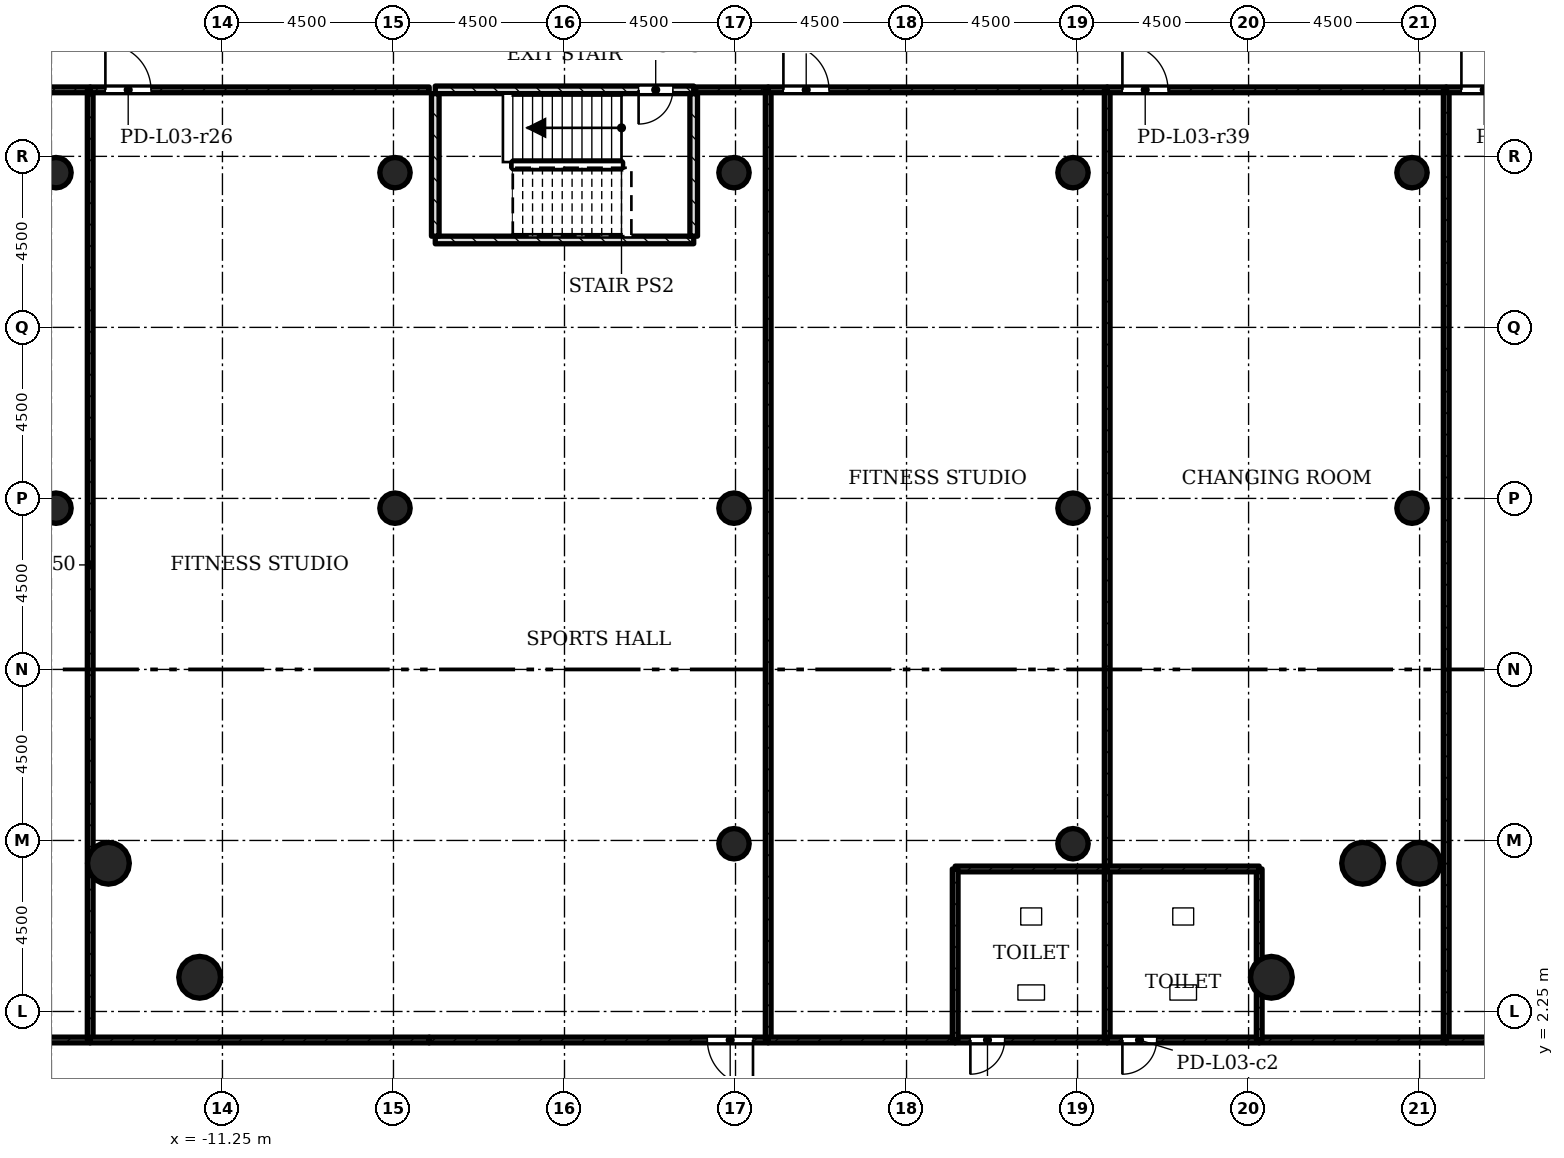
"""IFC4 building model, lengths in metres.
Left out: names, types, materials, properties, quantities, classifications, styles, units other than length and angle.
Written with IfcOpenShell. Run it as: python <this file> out.ifc"""

import sys

from ifc_helpers import new_model, si_unit, direction, frame, frame_2d, origin, origin_2d, place, context, subcontext, project, spatial, rectangle, hollow_circle, extrude, element, fill, save


model = new_model("IFC4")
c1 = context("Model", 3, precision=1e-05, world=origin(), true_north=direction((0.0, 1.0)))
c2 = subcontext(c1, "Body", "Model", "MODEL_VIEW")
j1 = project(units=[si_unit("LENGTHUNIT", "METRE"), si_unit("PLANEANGLEUNIT", "RADIAN")], contexts=[c1])
p1 = place(None, origin())
s1 = spatial("IfcSite", under=j1, at=p1, CompositionType="ELEMENT")
p2 = place(p1, origin())
s2 = spatial("IfcBuilding", under=s1, at=p2, CompositionType="ELEMENT")
p3 = place(p2, frame((0.0, 0.0, 15.5)))
s3 = spatial("IfcBuildingStorey", under=s2, at=p3, CompositionType="ELEMENT", Elevation=15.5)
for number, where, z_axis, x_axis in (
    (1, (-14.25, 6.15, 0.0), (0.0, 0.0, 1.0), (1.0, 0.0, 0.0)),
    (2, (-11.85, 3.15, 0.0), (0.0, 0.0, 1.0), (1.0, 0.0, 0.0)),
    (3, (20.25, 6.15, 0.0), (0.0, 0.0, 1.0), (1.0, 0.0, 0.0)),
    (4, (18.75, 6.15, 0.0), (0.0, 0.0, 1.0), (1.0, 0.0, 0.0)),
    (5, (16.35, 3.15, 0.0), (0.0, 0.0, 1.0), (1.0, 0.0, 0.0)),
):
    element("IfcColumn", number, at=place(p3, frame(where, z_axis=z_axis, x_axis=x_axis)), inside=s3, PredefinedType="COLUMN", context=c2, shape_type="SweptSolid", body=[
        extrude(hollow_circle(Radius=0.55, WallThickness=0.04, at=origin_2d()), origin(), (0.0, 0.0, 1.0), 4.5),
    ])
for number, where, z_axis, x_axis in (
    (6, (2.21, 6.664, 0.0), (0.0, 0.0, 1.0), (1.0, 0.0, 0.0)),
    (7, (11.13, 6.664, 0.0), (0.0, 0.0, 1.0), (1.0, 0.0, 0.0)),
    (8, (-15.63, 15.493, 0.0), (0.0, 0.0, 1.0), (1.0, 0.0, 0.0)),
    (9, (-6.71, 15.493, 0.0), (0.0, 0.0, 1.0), (1.0, 0.0, 0.0)),
    (10, (2.21, 15.493, 0.0), (0.0, 0.0, 1.0), (1.0, 0.0, 0.0)),
    (11, (11.13, 15.493, 0.0), (0.0, 0.0, 1.0), (1.0, 0.0, 0.0)),
    (12, (20.05, 15.493, 0.0), (0.0, 0.0, 1.0), (1.0, 0.0, 0.0)),
    (13, (-15.63, 24.321, 0.0), (0.0, 0.0, 1.0), (1.0, 0.0, 0.0)),
    (14, (-6.71, 24.321, 0.0), (0.0, 0.0, 1.0), (1.0, 0.0, 0.0)),
    (15, (2.21, 24.321, 0.0), (0.0, 0.0, 1.0), (1.0, 0.0, 0.0)),
    (16, (11.13, 24.321, 0.0), (0.0, 0.0, 1.0), (1.0, 0.0, 0.0)),
    (17, (20.05, 24.321, 0.0), (0.0, 0.0, 1.0), (1.0, 0.0, 0.0)),
):
    element("IfcColumn", number, at=place(p3, frame(where, z_axis=z_axis, x_axis=x_axis)), inside=s3, PredefinedType="COLUMN", context=c2, shape_type="SweptSolid", body=[
        extrude(hollow_circle(Radius=0.4, WallThickness=0.028, at=origin_2d()), origin(), (0.0, 0.0, 1.0), 4.5),
    ])
p4 = place(p3, frame((-23.65, 26.5, 0.0), z_axis=(0.0, 0.0, 1.0), x_axis=(1.0, 0.0, 0.0)))
e18 = element("IfcWall", 18, at=p4, inside=s3, PredefinedType="PARTITIONING", context=c2, shape_type="SweptSolid", body=[
    extrude(rectangle(XDim=8.92, YDim=0.15, at=frame_2d((4.46, 0.0))), origin(), (0.0, 0.0, 1.0), 4.08),
])
p5 = place(p4, frame((0.4, 0.0, 0.0)))
e19 = element("IfcOpeningElement", 19, at=p5, cuts=e18, PredefinedType="OPENING", context=c2, shape_type="SweptSolid", body=[
    extrude(rectangle(XDim=1.2, YDim=2.1, at=frame_2d((0.6, 1.05))), frame((0.0, 0.085, 0.0), z_axis=(0.0, -1.0, 0.0), x_axis=(1.0, 0.0, 0.0)), (0.0, 0.0, 1.0), 0.17),
])
p6 = place(p3, frame((-14.73, 1.5, 0.0), z_axis=(0.0, 0.0, 1.0), x_axis=(-1.0, 0.0, 0.0)))
e20 = element("IfcWall", 20, at=p6, inside=s3, PredefinedType="PARTITIONING", context=c2, shape_type="SweptSolid", body=[
    extrude(rectangle(XDim=5.52, YDim=0.15, at=frame_2d((2.76, 0.0))), origin(), (0.0, 0.0, 1.0), 4.08),
])
p7 = place(p3, frame((-14.73, 26.5, 0.0), z_axis=(0.0, 0.0, 1.0), x_axis=(0.0, -1.0, 0.0)))
e21 = element("IfcWall", 21, at=p7, inside=s3, PredefinedType="PARTITIONING", context=c2, shape_type="SweptSolid", body=[
    extrude(rectangle(XDim=25.0, YDim=0.15, at=frame_2d((12.5, 0.0))), origin(), (0.0, 0.0, 1.0), 4.08),
])
p8 = place(p3, frame((-14.73, 26.5, 0.0), z_axis=(0.0, 0.0, 1.0), x_axis=(1.0, 0.0, 0.0)))
e22 = element("IfcWall", 22, at=p8, inside=s3, PredefinedType="PARTITIONING", context=c2, shape_type="SweptSolid", body=[
    extrude(rectangle(XDim=8.92, YDim=0.15, at=frame_2d((4.46, 0.0))), origin(), (0.0, 0.0, 1.0), 4.08),
])
p9 = place(p8, frame((0.4, 0.0, 0.0)))
e23 = element("IfcOpeningElement", 23, at=p9, cuts=e22, PredefinedType="OPENING", context=c2, shape_type="SweptSolid", body=[
    extrude(rectangle(XDim=1.2, YDim=2.1, at=frame_2d((0.6, 1.05))), frame((0.0, 0.085, 0.0), z_axis=(0.0, -1.0, 0.0), x_axis=(1.0, 0.0, 0.0)), (0.0, 0.0, 1.0), 0.17),
])
p10 = place(p3, frame((-5.81, 1.5, 0.0), z_axis=(0.0, 0.0, 1.0), x_axis=(-1.0, 0.0, 0.0)))
e24 = element("IfcWall", 24, at=p10, inside=s3, PredefinedType="PARTITIONING", context=c2, shape_type="SweptSolid", body=[
    extrude(rectangle(XDim=8.92, YDim=0.15, at=frame_2d((4.46, 0.0))), origin(), (0.0, 0.0, 1.0), 4.08),
])
p11 = place(p3, frame((-5.65, 26.5, 0.0), z_axis=(0.0, 0.0, 1.0), x_axis=(1.0, 0.0, 0.0)))
e25 = element("IfcWall", 25, at=p11, inside=s3, PredefinedType="SHEAR", context=c2, shape_type="SweptSolid", body=[
    extrude(rectangle(XDim=6.8, YDim=0.2, at=frame_2d((3.4, 0.0))), origin(), (0.0, 0.0, 1.0), 4.08),
])
p12 = place(p11, frame((5.35, 0.0, 0.0)))
e26 = element("IfcOpeningElement", 26, at=p12, cuts=e25, PredefinedType="OPENING", context=c2, shape_type="SweptSolid", body=[
    extrude(rectangle(XDim=0.9, YDim=2.1, at=frame_2d((0.45, 1.05))), frame((0.0, 0.11, 0.0), z_axis=(0.0, -1.0, 0.0), x_axis=(1.0, 0.0, 0.0)), (0.0, 0.0, 1.0), 0.22),
])
p13 = place(p3, frame((-5.65, 22.55, 0.0), z_axis=(0.0, 0.0, 1.0), x_axis=(1.0, 0.0, 0.0)))
e27 = element("IfcWall", 27, at=p13, inside=s3, PredefinedType="SHEAR", context=c2, shape_type="SweptSolid", body=[
    extrude(rectangle(XDim=6.8, YDim=0.2, at=frame_2d((3.4, 0.0))), origin(), (0.0, 0.0, 1.0), 4.08),
])
for number, where, z_axis, x_axis in (
    (28, (-5.65, 22.65, 0.0), (0.0, 0.0, 1.0), (0.0, 1.0, 0.0)),
    (29, (1.15, 22.65, 0.0), (0.0, 0.0, 1.0), (0.0, 1.0, 0.0)),
):
    element("IfcWall", number, at=place(p3, frame(where, z_axis=z_axis, x_axis=x_axis)), inside=s3, PredefinedType="SHEAR", context=c2, shape_type="SweptSolid", body=[
        extrude(rectangle(XDim=3.75, YDim=0.2, at=frame_2d((1.875, 0.0))), origin(), (0.0, 0.0, 1.0), 4.08),
    ])
p14 = place(p3, frame((1.15, 26.5, 0.0), z_axis=(0.0, 0.0, 1.0), x_axis=(1.0, 0.0, 0.0)))
e30 = element("IfcWall", 30, at=p14, inside=s3, PredefinedType="PARTITIONING", context=c2, shape_type="SweptSolid", body=[
    extrude(rectangle(XDim=1.96, YDim=0.15, at=frame_2d((0.98, 0.0))), origin(), (0.0, 0.0, 1.0), 4.08),
])
p15 = place(p3, frame((3.11, 1.5, 0.0), z_axis=(0.0, 0.0, 1.0), x_axis=(-1.0, 0.0, 0.0)))
e31 = element("IfcWall", 31, at=p15, inside=s3, PredefinedType="PARTITIONING", context=c2, shape_type="SweptSolid", body=[
    extrude(rectangle(XDim=8.92, YDim=0.15, at=frame_2d((4.46, 0.0))), origin(), (0.0, 0.0, 1.0), 4.08),
])
p16 = place(p15, frame((0.4, 0.0, 0.0)))
e32 = element("IfcOpeningElement", 32, at=p16, cuts=e31, PredefinedType="OPENING", context=c2, shape_type="SweptSolid", body=[
    extrude(rectangle(XDim=1.2, YDim=2.1, at=frame_2d((0.6, 1.05))), frame((0.0, 0.085, 0.0), z_axis=(0.0, -1.0, 0.0), x_axis=(1.0, 0.0, 0.0)), (0.0, 0.0, 1.0), 0.17),
])
p17 = place(p3, frame((3.11, 26.5, 0.0), z_axis=(0.0, 0.0, 1.0), x_axis=(0.0, -1.0, 0.0)))
e33 = element("IfcWall", 33, at=p17, inside=s3, PredefinedType="PARTITIONING", context=c2, shape_type="SweptSolid", body=[
    extrude(rectangle(XDim=25.0, YDim=0.15, at=frame_2d((12.5, 0.0))), origin(), (0.0, 0.0, 1.0), 4.08),
])
p18 = place(p3, frame((8.03, 1.5, 0.0), z_axis=(0.0, 0.0, 1.0), x_axis=(-1.0, 0.0, 0.0)))
e34 = element("IfcWall", 34, at=p18, inside=s3, PredefinedType="PARTITIONING", context=c2, shape_type="SweptSolid", body=[
    extrude(rectangle(XDim=4.92, YDim=0.15, at=frame_2d((2.46, 0.0))), origin(), (0.0, 0.0, 1.0), 4.08),
])
p19 = place(p3, frame((3.11, 26.5, 0.0), z_axis=(0.0, 0.0, 1.0), x_axis=(1.0, 0.0, 0.0)))
e35 = element("IfcWall", 35, at=p19, inside=s3, PredefinedType="PARTITIONING", context=c2, shape_type="SweptSolid", body=[
    extrude(rectangle(XDim=8.92, YDim=0.15, at=frame_2d((4.46, 0.0))), origin(), (0.0, 0.0, 1.0), 4.08),
])
p20 = place(p19, frame((0.4, 0.0, 0.0)))
e36 = element("IfcOpeningElement", 36, at=p20, cuts=e35, PredefinedType="OPENING", context=c2, shape_type="SweptSolid", body=[
    extrude(rectangle(XDim=1.2, YDim=2.1, at=frame_2d((0.6, 1.05))), frame((0.0, 0.085, 0.0), z_axis=(0.0, -1.0, 0.0), x_axis=(1.0, 0.0, 0.0)), (0.0, 0.0, 1.0), 0.17),
])
p21 = place(p3, frame((12.03, 26.5, 0.0), z_axis=(0.0, 0.0, 1.0), x_axis=(0.0, -1.0, 0.0)))
e37 = element("IfcWall", 37, at=p21, inside=s3, PredefinedType="PARTITIONING", context=c2, shape_type="SweptSolid", body=[
    extrude(rectangle(XDim=20.5, YDim=0.15, at=frame_2d((10.25, 0.0))), origin(), (0.0, 0.0, 1.0), 4.08),
])
p22 = place(p3, frame((12.03, 26.5, 0.0), z_axis=(0.0, 0.0, 1.0), x_axis=(1.0, 0.0, 0.0)))
e38 = element("IfcWall", 38, at=p22, inside=s3, PredefinedType="PARTITIONING", context=c2, shape_type="SweptSolid", body=[
    extrude(rectangle(XDim=8.92, YDim=0.15, at=frame_2d((4.46, 0.0))), origin(), (0.0, 0.0, 1.0), 4.08),
])
p23 = place(p22, frame((0.4, 0.0, 0.0)))
e39 = element("IfcOpeningElement", 39, at=p23, cuts=e38, PredefinedType="OPENING", context=c2, shape_type="SweptSolid", body=[
    extrude(rectangle(XDim=1.2, YDim=2.1, at=frame_2d((0.6, 1.05))), frame((0.0, 0.085, 0.0), z_axis=(0.0, -1.0, 0.0), x_axis=(1.0, 0.0, 0.0)), (0.0, 0.0, 1.0), 0.17),
])
p24 = place(p3, frame((20.95, 1.5, 0.0), z_axis=(0.0, 0.0, 1.0), x_axis=(-1.0, 0.0, 0.0)))
e40 = element("IfcWall", 40, at=p24, inside=s3, PredefinedType="PARTITIONING", context=c2, shape_type="SweptSolid", body=[
    extrude(rectangle(XDim=4.92, YDim=0.15, at=frame_2d((2.46, 0.0))), origin(), (0.0, 0.0, 1.0), 4.08),
])
p25 = place(p3, frame((20.95, 26.5, 0.0), z_axis=(0.0, 0.0, 1.0), x_axis=(0.0, -1.0, 0.0)))
e41 = element("IfcWall", 41, at=p25, inside=s3, PredefinedType="PARTITIONING", context=c2, shape_type="SweptSolid", body=[
    extrude(rectangle(XDim=25.0, YDim=0.15, at=frame_2d((12.5, 0.0))), origin(), (0.0, 0.0, 1.0), 4.08),
])
p26 = place(p3, frame((20.95, 26.5, 0.0), z_axis=(0.0, 0.0, 1.0), x_axis=(1.0, 0.0, 0.0)))
e42 = element("IfcWall", 42, at=p26, inside=s3, PredefinedType="PARTITIONING", context=c2, shape_type="SweptSolid", body=[
    extrude(rectangle(XDim=8.92, YDim=0.15, at=frame_2d((4.46, 0.0))), origin(), (0.0, 0.0, 1.0), 4.08),
])
p27 = place(p26, frame((0.4, 0.0, 0.0)))
e43 = element("IfcOpeningElement", 43, at=p27, cuts=e42, PredefinedType="OPENING", context=c2, shape_type="SweptSolid", body=[
    extrude(rectangle(XDim=1.2, YDim=2.1, at=frame_2d((0.6, 1.05))), frame((0.0, 0.085, 0.0), z_axis=(0.0, -1.0, 0.0), x_axis=(1.0, 0.0, 0.0)), (0.0, 0.0, 1.0), 0.17),
])
p28 = place(p3, frame((29.25, 1.5, 0.0), z_axis=(0.0, 0.0, 1.0), x_axis=(-1.0, 0.0, 0.0)))
e44 = element("IfcWall", 44, at=p28, inside=s3, PredefinedType="PARTITIONING", context=c2, shape_type="SweptSolid", body=[
    extrude(rectangle(XDim=8.3, YDim=0.15, at=frame_2d((4.15, 0.0))), origin(), (0.0, 0.0, 1.0), 4.08),
])
p29 = place(p3, frame((8.03, 1.5, 0.0), z_axis=(0.0, 0.0, 1.0), x_axis=(1.0, 0.0, 0.0)))
e45 = element("IfcWall", 45, at=p29, inside=s3, PredefinedType="PARTITIONING", context=c2, shape_type="SweptSolid", body=[
    extrude(rectangle(XDim=4.0, YDim=0.15, at=frame_2d((2.0, 0.0))), origin(), (0.0, 0.0, 1.0), 4.08),
])
p30 = place(p29, frame((0.4, 0.0, 0.0)))
e46 = element("IfcOpeningElement", 46, at=p30, cuts=e45, PredefinedType="OPENING", context=c2, shape_type="SweptSolid", body=[
    extrude(rectangle(XDim=0.9, YDim=2.1, at=frame_2d((0.45, 1.05))), frame((0.0, 0.085, 0.0), z_axis=(0.0, -1.0, 0.0), x_axis=(1.0, 0.0, 0.0)), (0.0, 0.0, 1.0), 0.17),
])
p31 = place(p3, frame((12.03, 6.0, 0.0), z_axis=(0.0, 0.0, 1.0), x_axis=(-1.0, 0.0, 0.0)))
e47 = element("IfcWall", 47, at=p31, inside=s3, PredefinedType="PARTITIONING", context=c2, shape_type="SweptSolid", body=[
    extrude(rectangle(XDim=4.0, YDim=0.15, at=frame_2d((2.0, 0.0))), origin(), (0.0, 0.0, 1.0), 4.08),
])
for number, where, z_axis, x_axis in (
    (48, (8.03, 6.0, 0.0), (0.0, 0.0, 1.0), (0.0, -1.0, 0.0)),
    (49, (12.03, 1.5, 0.0), (0.0, 0.0, 1.0), (0.0, 1.0, 0.0)),
):
    element("IfcWall", number, at=place(p3, frame(where, z_axis=z_axis, x_axis=x_axis)), inside=s3, PredefinedType="PARTITIONING", context=c2, shape_type="SweptSolid", body=[
        extrude(rectangle(XDim=4.5, YDim=0.15, at=frame_2d((2.25, 0.0))), origin(), (0.0, 0.0, 1.0), 4.08),
    ])
p32 = place(p3, frame((12.03, 1.5, 0.0), z_axis=(0.0, 0.0, 1.0), x_axis=(1.0, 0.0, 0.0)))
e50 = element("IfcWall", 50, at=p32, inside=s3, PredefinedType="PARTITIONING", context=c2, shape_type="SweptSolid", body=[
    extrude(rectangle(XDim=4.0, YDim=0.15, at=frame_2d((2.0, 0.0))), origin(), (0.0, 0.0, 1.0), 4.08),
])
p33 = place(p32, frame((0.4, 0.0, 0.0)))
e51 = element("IfcOpeningElement", 51, at=p33, cuts=e50, PredefinedType="OPENING", context=c2, shape_type="SweptSolid", body=[
    extrude(rectangle(XDim=0.9, YDim=2.1, at=frame_2d((0.45, 1.05))), frame((0.0, 0.085, 0.0), z_axis=(0.0, -1.0, 0.0), x_axis=(1.0, 0.0, 0.0)), (0.0, 0.0, 1.0), 0.17),
])
p34 = place(p3, frame((16.03, 1.5, 0.0), z_axis=(0.0, 0.0, 1.0), x_axis=(0.0, 1.0, 0.0)))
e52 = element("IfcWall", 52, at=p34, inside=s3, PredefinedType="PARTITIONING", context=c2, shape_type="SweptSolid", body=[
    extrude(rectangle(XDim=4.5, YDim=0.15, at=frame_2d((2.25, 0.0))), origin(), (0.0, 0.0, 1.0), 4.08),
])
p35 = place(p3, frame((16.03, 6.0, 0.0), z_axis=(0.0, 0.0, 1.0), x_axis=(-1.0, 0.0, 0.0)))
e53 = element("IfcWall", 53, at=p35, inside=s3, PredefinedType="PARTITIONING", context=c2, shape_type="SweptSolid", body=[
    extrude(rectangle(XDim=4.0, YDim=0.15, at=frame_2d((2.0, 0.0))), origin(), (0.0, 0.0, 1.0), 4.08),
])
p36 = place(p9, origin())
e54 = element("IfcDoor", 54, at=p36, inside=s3, OperationType="SINGLE_SWING_RIGHT", PredefinedType="DOOR", context=c2, shape_type="SweptSolid", body=[
    extrude(rectangle(XDim=1.2, YDim=2.1, at=frame_2d((0.6, 1.05))), frame((0.0, 0.025, 0.0), z_axis=(0.0, -1.0, 0.0), x_axis=(1.0, 0.0, 0.0)), (0.0, 0.0, 1.0), 0.05),
])
fill(e23, e54)
p37 = place(p12, origin())
e55 = element("IfcDoor", 55, at=p37, inside=s3, OperationType="SINGLE_SWING_LEFT", PredefinedType="DOOR", context=c2, shape_type="SweptSolid", body=[
    extrude(rectangle(XDim=0.9, YDim=2.1, at=frame_2d((0.45, 1.05))), frame((0.0, 0.025, 0.0), z_axis=(0.0, -1.0, 0.0), x_axis=(1.0, 0.0, 0.0)), (0.0, 0.0, 1.0), 0.05),
])
fill(e26, e55)
p38 = place(p16, origin())
e56 = element("IfcDoor", 56, at=p38, inside=s3, OperationType="SINGLE_SWING_RIGHT", PredefinedType="DOOR", context=c2, shape_type="SweptSolid", body=[
    extrude(rectangle(XDim=1.2, YDim=2.1, at=frame_2d((0.6, 1.05))), frame((0.0, 0.025, 0.0), z_axis=(0.0, -1.0, 0.0), x_axis=(1.0, 0.0, 0.0)), (0.0, 0.0, 1.0), 0.05),
])
fill(e32, e56)
p39 = place(p20, origin())
e57 = element("IfcDoor", 57, at=p39, inside=s3, OperationType="SINGLE_SWING_RIGHT", PredefinedType="DOOR", context=c2, shape_type="SweptSolid", body=[
    extrude(rectangle(XDim=1.2, YDim=2.1, at=frame_2d((0.6, 1.05))), frame((0.0, 0.025, 0.0), z_axis=(0.0, -1.0, 0.0), x_axis=(1.0, 0.0, 0.0)), (0.0, 0.0, 1.0), 0.05),
])
fill(e36, e57)
p40 = place(p23, origin())
e58 = element("IfcDoor", 58, at=p40, inside=s3, OperationType="SINGLE_SWING_RIGHT", PredefinedType="DOOR", context=c2, shape_type="SweptSolid", body=[
    extrude(rectangle(XDim=1.2, YDim=2.1, at=frame_2d((0.6, 1.05))), frame((0.0, 0.025, 0.0), z_axis=(0.0, -1.0, 0.0), x_axis=(1.0, 0.0, 0.0)), (0.0, 0.0, 1.0), 0.05),
])
fill(e39, e58)
p41 = place(p27, origin())
e59 = element("IfcDoor", 59, at=p41, inside=s3, OperationType="SINGLE_SWING_RIGHT", PredefinedType="DOOR", context=c2, shape_type="SweptSolid", body=[
    extrude(rectangle(XDim=1.2, YDim=2.1, at=frame_2d((0.6, 1.05))), frame((0.0, 0.025, 0.0), z_axis=(0.0, -1.0, 0.0), x_axis=(1.0, 0.0, 0.0)), (0.0, 0.0, 1.0), 0.05),
])
fill(e43, e59)
p42 = place(p30, origin())
e60 = element("IfcDoor", 60, at=p42, inside=s3, OperationType="SINGLE_SWING_LEFT", PredefinedType="DOOR", context=c2, shape_type="SweptSolid", body=[
    extrude(rectangle(XDim=0.9, YDim=2.1, at=frame_2d((0.45, 1.05))), frame((0.0, 0.025, 0.0), z_axis=(0.0, -1.0, 0.0), x_axis=(1.0, 0.0, 0.0)), (0.0, 0.0, 1.0), 0.05),
])
fill(e46, e60)
p43 = place(p33, origin())
e61 = element("IfcDoor", 61, at=p43, inside=s3, OperationType="SINGLE_SWING_LEFT", PredefinedType="DOOR", context=c2, shape_type="SweptSolid", body=[
    extrude(rectangle(XDim=0.9, YDim=2.1, at=frame_2d((0.45, 1.05))), frame((0.0, 0.025, 0.0), z_axis=(0.0, -1.0, 0.0), x_axis=(1.0, 0.0, 0.0)), (0.0, 0.0, 1.0), 0.05),
])
fill(e51, e61)
save(model, sys.argv[1])
